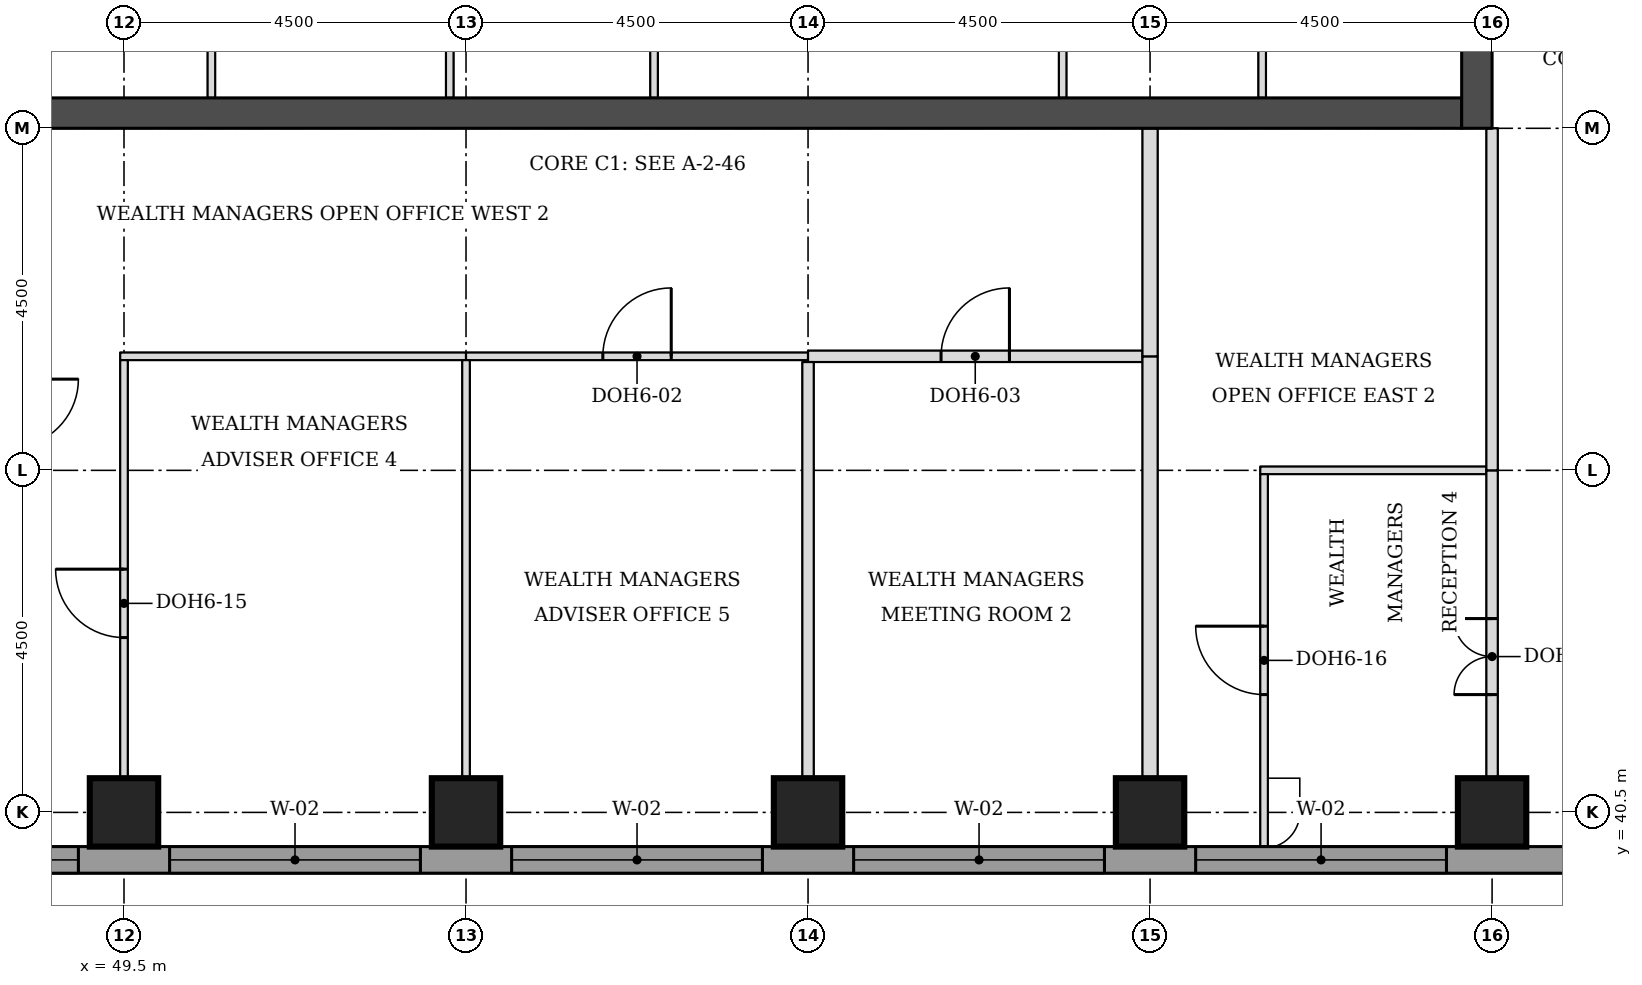
"""IFC4 building model, lengths in metres.
Left out: names, types, materials, properties, quantities, classifications, styles, units other than length and angle.
Written with IfcOpenShell. Run it as: python <this file> out.ifc"""

import sys

from ifc_helpers import new_model, si_unit, direction, frame, frame_2d, origin, origin_2d, place, context, subcontext, project, spatial, rectangle, extrude, element, fill, save


model = new_model("IFC4")
c1 = context("Model", 3, precision=1e-05, world=origin(), true_north=direction((0.0, 1.0)))
c2 = subcontext(c1, "Body", "Model", "MODEL_VIEW")
j1 = project(units=[si_unit("LENGTHUNIT", "METRE"), si_unit("PLANEANGLEUNIT", "RADIAN")], contexts=[c1])
p1 = place(None, origin())
s1 = spatial("IfcSite", under=j1, at=p1, CompositionType="ELEMENT")
p2 = place(p1, origin())
s2 = spatial("IfcBuilding", under=s1, at=p2, CompositionType="ELEMENT")
p3 = place(p2, frame((0.0, 0.0, 184.7)))
s3 = spatial("IfcBuildingStorey", under=s2, at=p3, CompositionType="ELEMENT", Elevation=184.7)
for number, where, z_axis, x_axis in (
    (1, (49.5, 40.5, 0.0), (0.0, 0.0, 1.0), (1.0, 0.0, 0.0)),
    (2, (54.0, 40.5, 0.0), (0.0, 0.0, 1.0), (1.0, 0.0, 0.0)),
    (3, (58.5, 40.5, 0.0), (0.0, 0.0, 1.0), (1.0, 0.0, 0.0)),
    (4, (63.0, 40.5, 0.0), (0.0, 0.0, 1.0), (1.0, 0.0, 0.0)),
    (5, (67.5, 40.5, 0.0), (0.0, 0.0, 1.0), (1.0, 0.0, 0.0)),
):
    element("IfcColumn", number, at=place(p3, frame(where, z_axis=z_axis, x_axis=x_axis)), inside=s3, PredefinedType="COLUMN", context=c2, shape_type="SweptSolid", body=[
        extrude(rectangle(XDim=0.9, YDim=0.9, at=origin_2d()), origin(), (0.0, 0.0, 1.0), 3.7),
    ])
p4 = place(p3, frame((45.4, 49.7, 0.0), z_axis=(0.0, 0.0, 1.0), x_axis=(1.0, 0.0, 0.0)))
e6 = element("IfcWall", 6, at=p4, inside=s3, PredefinedType="SHEAR", context=c2, shape_type="SweptSolid", body=[
    extrude(rectangle(XDim=21.7, YDim=0.4, at=frame_2d((10.85, 0.0))), origin(), (0.0, 0.0, 1.0), 3.7),
])
p5 = place(p3, frame((67.3, 49.5, 0.0), z_axis=(0.0, 0.0, 1.0), x_axis=(0.0, 1.0, 0.0)))
e7 = element("IfcWall", 7, at=p5, inside=s3, PredefinedType="SHEAR", context=c2, shape_type="SweptSolid", body=[
    extrude(rectangle(XDim=22.5, YDim=0.4, at=frame_2d((11.25, 0.0))), origin(), (0.0, 0.0, 1.0), 3.7),
])
p6 = place(p5, frame((4.2, 0.0, 0.0)))
e8 = element("IfcOpeningElement", 8, at=p6, cuts=e7, PredefinedType="OPENING", context=c2, shape_type="SweptSolid", body=[
    extrude(rectangle(XDim=1.8, YDim=2.1, at=frame_2d((0.9, 1.05))), frame((0.0, 0.21, 0.0), z_axis=(0.0, -1.0, 0.0), x_axis=(1.0, 0.0, 0.0)), (0.0, 0.0, 1.0), 0.42),
])
p7 = place(p5, frame((6.9, 0.0, 0.0)))
e9 = element("IfcOpeningElement", 9, at=p7, cuts=e7, PredefinedType="OPENING", context=c2, shape_type="SweptSolid", body=[
    extrude(rectangle(XDim=1.1, YDim=2.1, at=frame_2d((0.55, 1.05))), frame((0.0, 0.21, 0.0), z_axis=(0.0, -1.0, 0.0), x_axis=(1.0, 0.0, 0.0)), (0.0, 0.0, 1.0), 0.42),
])
p8 = place(p5, frame((13.6, 0.0, 0.0)))
e10 = element("IfcOpeningElement", 10, at=p8, cuts=e7, PredefinedType="OPENING", context=c2, shape_type="SweptSolid", body=[
    extrude(rectangle(XDim=1.1, YDim=2.1, at=frame_2d((0.55, 1.05))), frame((0.0, 0.21, 0.0), z_axis=(0.0, -1.0, 0.0), x_axis=(1.0, 0.0, 0.0)), (0.0, 0.0, 1.0), 0.42),
])
p9 = place(p5, frame((16.5, 0.0, 0.0)))
e11 = element("IfcOpeningElement", 11, at=p9, cuts=e7, PredefinedType="OPENING", context=c2, shape_type="SweptSolid", body=[
    extrude(rectangle(XDim=1.8, YDim=2.1, at=frame_2d((0.9, 1.05))), frame((0.0, 0.21, 0.0), z_axis=(0.0, -1.0, 0.0), x_axis=(1.0, 0.0, 0.0)), (0.0, 0.0, 1.0), 0.42),
])
p10 = place(p3, frame((36.0, 39.875, 0.0), z_axis=(0.0, 0.0, 1.0), x_axis=(1.0, 0.0, 0.0)))
e12 = element("IfcWall", 12, at=p10, inside=s3, PredefinedType="STANDARD", context=c2, shape_type="SweptSolid", body=[
    extrude(rectangle(XDim=36.331, YDim=0.35, at=frame_2d((18.166, 0.0))), origin(), (0.0, 0.0, 1.0), 3.525),
])
p11 = place(p10, frame((5.1, 0.0, 0.9)))
e13 = element("IfcOpeningElement", 13, at=p11, cuts=e12, PredefinedType="OPENING", context=c2, shape_type="SweptSolid", body=[
    extrude(rectangle(XDim=3.3, YDim=1.9, at=frame_2d((1.65, 0.95))), frame((0.0, 0.185, 0.0), z_axis=(0.0, -1.0, 0.0), x_axis=(1.0, 0.0, 0.0)), (0.0, 0.0, 1.0), 0.37),
])
p12 = place(p10, frame((9.6, 0.0, 0.9)))
e14 = element("IfcOpeningElement", 14, at=p12, cuts=e12, PredefinedType="OPENING", context=c2, shape_type="SweptSolid", body=[
    extrude(rectangle(XDim=3.3, YDim=1.9, at=frame_2d((1.65, 0.95))), frame((0.0, 0.185, 0.0), z_axis=(0.0, -1.0, 0.0), x_axis=(1.0, 0.0, 0.0)), (0.0, 0.0, 1.0), 0.37),
])
p13 = place(p10, frame((14.1, 0.0, 0.9)))
e15 = element("IfcOpeningElement", 15, at=p13, cuts=e12, PredefinedType="OPENING", context=c2, shape_type="SweptSolid", body=[
    extrude(rectangle(XDim=3.3, YDim=1.9, at=frame_2d((1.65, 0.95))), frame((0.0, 0.185, 0.0), z_axis=(0.0, -1.0, 0.0), x_axis=(1.0, 0.0, 0.0)), (0.0, 0.0, 1.0), 0.37),
])
p14 = place(p10, frame((18.6, 0.0, 0.9)))
e16 = element("IfcOpeningElement", 16, at=p14, cuts=e12, PredefinedType="OPENING", context=c2, shape_type="SweptSolid", body=[
    extrude(rectangle(XDim=3.3, YDim=1.9, at=frame_2d((1.65, 0.95))), frame((0.0, 0.185, 0.0), z_axis=(0.0, -1.0, 0.0), x_axis=(1.0, 0.0, 0.0)), (0.0, 0.0, 1.0), 0.37),
])
p15 = place(p10, frame((23.1, 0.0, 0.9)))
e17 = element("IfcOpeningElement", 17, at=p15, cuts=e12, PredefinedType="OPENING", context=c2, shape_type="SweptSolid", body=[
    extrude(rectangle(XDim=3.3, YDim=1.9, at=frame_2d((1.65, 0.95))), frame((0.0, 0.185, 0.0), z_axis=(0.0, -1.0, 0.0), x_axis=(1.0, 0.0, 0.0)), (0.0, 0.0, 1.0), 0.37),
])
p16 = place(p10, frame((27.6, 0.0, 0.9)))
e18 = element("IfcOpeningElement", 18, at=p16, cuts=e12, PredefinedType="OPENING", context=c2, shape_type="SweptSolid", body=[
    extrude(rectangle(XDim=3.3, YDim=1.9, at=frame_2d((1.65, 0.95))), frame((0.0, 0.185, 0.0), z_axis=(0.0, -1.0, 0.0), x_axis=(1.0, 0.0, 0.0)), (0.0, 0.0, 1.0), 0.37),
])
p17 = place(p3, frame((64.45, 45.0, 0.0), z_axis=(0.0, 0.0, 1.0), x_axis=(1.0, 0.0, 0.0)))
e19 = element("IfcWall", 19, at=p17, inside=s3, PredefinedType="PARTITIONING", context=c2, shape_type="SweptSolid", body=[
    extrude(rectangle(XDim=2.975, YDim=0.1, at=frame_2d((1.488, 0.0))), origin(), (0.0, 0.0, 1.0), 3.55),
])
p18 = place(p3, frame((49.45, 46.5, 0.0), z_axis=(0.0, 0.0, 1.0), x_axis=(1.0, 0.0, 0.0)))
e20 = element("IfcWall", 20, at=p18, inside=s3, PredefinedType="PARTITIONING", context=c2, shape_type="SweptSolid", body=[
    extrude(rectangle(XDim=4.55, YDim=0.1, at=frame_2d((2.275, 0.0))), origin(), (0.0, 0.0, 1.0), 3.55),
])
p19 = place(p3, frame((54.0, 46.5, 0.0), z_axis=(0.0, 0.0, 1.0), x_axis=(1.0, 0.0, 0.0)))
e21 = element("IfcWall", 21, at=p19, inside=s3, PredefinedType="PARTITIONING", context=c2, shape_type="SweptSolid", body=[
    extrude(rectangle(XDim=4.5, YDim=0.1, at=frame_2d((2.25, 0.0))), origin(), (0.0, 0.0, 1.0), 3.55),
])
p20 = place(p19, frame((1.8, 0.0, 0.0)))
e22 = element("IfcOpeningElement", 22, at=p20, cuts=e21, PredefinedType="OPENING", context=c2, shape_type="SweptSolid", body=[
    extrude(rectangle(XDim=0.9, YDim=2.1, at=frame_2d((0.45, 1.05))), frame((0.0, 0.06, 0.0), z_axis=(0.0, -1.0, 0.0), x_axis=(1.0, 0.0, 0.0)), (0.0, 0.0, 1.0), 0.12),
])
p21 = place(p3, frame((58.5, 46.5, 0.0), z_axis=(0.0, 0.0, 1.0), x_axis=(1.0, 0.0, 0.0)))
e23 = element("IfcWall", 23, at=p21, inside=s3, PredefinedType="PARTITIONING", context=c2, shape_type="SweptSolid", body=[
    extrude(rectangle(XDim=4.4, YDim=0.15, at=frame_2d((2.2, 0.0))), origin(), (0.0, 0.0, 1.0), 3.55),
])
p22 = place(p21, frame((1.75, 0.0, 0.0)))
e24 = element("IfcOpeningElement", 24, at=p22, cuts=e23, PredefinedType="OPENING", context=c2, shape_type="SweptSolid", body=[
    extrude(rectangle(XDim=0.9, YDim=2.1, at=frame_2d((0.45, 1.05))), frame((0.0, 0.085, 0.0), z_axis=(0.0, -1.0, 0.0), x_axis=(1.0, 0.0, 0.0)), (0.0, 0.0, 1.0), 0.17),
])
p23 = place(p3, frame((49.5, 40.05, 0.0), z_axis=(0.0, 0.0, 1.0), x_axis=(0.0, 1.0, 0.0)))
e25 = element("IfcWall", 25, at=p23, inside=s3, PredefinedType="PARTITIONING", context=c2, shape_type="SweptSolid", body=[
    extrude(rectangle(XDim=6.4, YDim=0.1, at=frame_2d((3.2, 0.0))), origin(), (0.0, 0.0, 1.0), 3.55),
])
p24 = place(p23, frame((2.75, 0.0, 0.0)))
e26 = element("IfcOpeningElement", 26, at=p24, cuts=e25, PredefinedType="OPENING", context=c2, shape_type="SweptSolid", body=[
    extrude(rectangle(XDim=0.9, YDim=2.1, at=frame_2d((0.45, 1.05))), frame((0.0, 0.06, 0.0), z_axis=(0.0, -1.0, 0.0), x_axis=(1.0, 0.0, 0.0)), (0.0, 0.0, 1.0), 0.12),
])
p25 = place(p3, frame((54.0, 40.05, 0.0), z_axis=(0.0, 0.0, 1.0), x_axis=(0.0, 1.0, 0.0)))
e27 = element("IfcWall", 27, at=p25, inside=s3, PredefinedType="PARTITIONING", context=c2, shape_type="SweptSolid", body=[
    extrude(rectangle(XDim=6.4, YDim=0.1, at=frame_2d((3.2, 0.0))), origin(), (0.0, 0.0, 1.0), 3.55),
])
p26 = place(p3, frame((58.5, 40.05, 0.0), z_axis=(0.0, 0.0, 1.0), x_axis=(0.0, 1.0, 0.0)))
e28 = element("IfcWall", 28, at=p26, inside=s3, PredefinedType="PARTITIONING", context=c2, shape_type="SweptSolid", body=[
    extrude(rectangle(XDim=6.375, YDim=0.15, at=frame_2d((3.188, 0.0))), origin(), (0.0, 0.0, 1.0), 3.55),
])
p27 = place(p3, frame((63.0, 40.05, 0.0), z_axis=(0.0, 0.0, 1.0), x_axis=(0.0, 1.0, 0.0)))
e29 = element("IfcWall", 29, at=p27, inside=s3, PredefinedType="PARTITIONING", context=c2, shape_type="SweptSolid", body=[
    extrude(rectangle(XDim=6.45, YDim=0.2, at=frame_2d((3.225, 0.0))), origin(), (0.0, 0.0, 1.0), 3.55),
])
p28 = place(p3, frame((64.5, 40.05, 0.0), z_axis=(0.0, 0.0, 1.0), x_axis=(0.0, 1.0, 0.0)))
e30 = element("IfcWall", 30, at=p28, inside=s3, PredefinedType="PARTITIONING", context=c2, shape_type="SweptSolid", body=[
    extrude(rectangle(XDim=4.9, YDim=0.1, at=frame_2d((2.45, 0.0))), origin(), (0.0, 0.0, 1.0), 3.55),
])
p29 = place(p28, frame((2.0, 0.0, 0.0)))
e31 = element("IfcOpeningElement", 31, at=p29, cuts=e30, PredefinedType="OPENING", context=c2, shape_type="SweptSolid", body=[
    extrude(rectangle(XDim=0.9, YDim=2.1, at=frame_2d((0.45, 1.05))), frame((0.0, 0.06, 0.0), z_axis=(0.0, -1.0, 0.0), x_axis=(1.0, 0.0, 0.0)), (0.0, 0.0, 1.0), 0.12),
])
p30 = place(p3, frame((67.5, 40.05, 0.0), z_axis=(0.0, 0.0, 1.0), x_axis=(0.0, 1.0, 0.0)))
e32 = element("IfcWall", 32, at=p30, inside=s3, PredefinedType="PARTITIONING", context=c2, shape_type="SweptSolid", body=[
    extrude(rectangle(XDim=4.95, YDim=0.15, at=frame_2d((2.475, 0.0))), origin(), (0.0, 0.0, 1.0), 3.022),
])
p31 = place(p30, frame((2.0, 0.0, 0.0)))
e33 = element("IfcOpeningElement", 33, at=p31, cuts=e32, PredefinedType="OPENING", context=c2, shape_type="SweptSolid", body=[
    extrude(rectangle(XDim=1.0, YDim=2.1, at=frame_2d((0.5, 1.05))), frame((0.0, 0.085, 0.0), z_axis=(0.0, -1.0, 0.0), x_axis=(1.0, 0.0, 0.0)), (0.0, 0.0, 1.0), 0.17),
])
p32 = place(p3, frame((67.5, 45.0, 0.0), z_axis=(0.0, 0.0, 1.0), x_axis=(0.0, 1.0, 0.0)))
e34 = element("IfcWall", 34, at=p32, inside=s3, PredefinedType="PARTITIONING", context=c2, shape_type="SweptSolid", body=[
    extrude(rectangle(XDim=4.5, YDim=0.15, at=frame_2d((2.25, 0.0))), origin(), (0.0, 0.0, 1.0), 3.022),
])
p33 = place(p3, frame((63.0, 46.5, 0.0), z_axis=(0.0, 0.0, 1.0), x_axis=(0.0, 1.0, 0.0)))
e35 = element("IfcWall", 35, at=p33, inside=s3, PredefinedType="PARTITIONING", context=c2, shape_type="SweptSolid", body=[
    extrude(rectangle(XDim=3.0, YDim=0.2, at=frame_2d((1.5, 0.0))), origin(), (0.0, 0.0, 1.0), 3.55),
])
for number, where, z_axis, x_axis in (
    (36, (50.65, 49.9, 0.0), (0.0, 0.0, 1.0), (0.0, 1.0, 0.0)),
    (37, (53.786, 49.9, 0.0), (0.0, 0.0, 1.0), (0.0, 1.0, 0.0)),
    (38, (56.474, 49.9, 0.0), (0.0, 0.0, 1.0), (0.0, 1.0, 0.0)),
    (39, (61.85, 49.9, 0.0), (0.0, 0.0, 1.0), (0.0, 1.0, 0.0)),
    (40, (64.475, 49.9, 0.0), (0.0, 0.0, 1.0), (0.0, 1.0, 0.0)),
):
    element("IfcWall", number, at=place(p3, frame(where, z_axis=z_axis, x_axis=x_axis)), inside=s3, PredefinedType="PARTITIONING", context=c2, shape_type="SweptSolid", body=[
        extrude(rectangle(XDim=3.1, YDim=0.1, at=frame_2d((1.55, 0.0))), origin(), (0.0, 0.0, 1.0), 3.55),
    ])
p34 = place(p12, origin())
e41 = element("IfcWindow", 41, at=p34, inside=s3, PartitioningType="SINGLE_PANEL", PredefinedType="WINDOW", context=c2, shape_type="SweptSolid", body=[
    extrude(rectangle(XDim=3.3, YDim=1.9, at=frame_2d((1.65, 0.95))), frame((0.0, 0.085, 0.0), z_axis=(0.0, -1.0, 0.0), x_axis=(1.0, 0.0, 0.0)), (0.0, 0.0, 1.0), 0.06),
])
fill(e14, e41)
p35 = place(p13, origin())
e42 = element("IfcWindow", 42, at=p35, inside=s3, PartitioningType="SINGLE_PANEL", PredefinedType="WINDOW", context=c2, shape_type="SweptSolid", body=[
    extrude(rectangle(XDim=3.3, YDim=1.9, at=frame_2d((1.65, 0.95))), frame((0.0, 0.085, 0.0), z_axis=(0.0, -1.0, 0.0), x_axis=(1.0, 0.0, 0.0)), (0.0, 0.0, 1.0), 0.06),
])
fill(e15, e42)
p36 = place(p14, origin())
e43 = element("IfcWindow", 43, at=p36, inside=s3, PartitioningType="SINGLE_PANEL", PredefinedType="WINDOW", context=c2, shape_type="SweptSolid", body=[
    extrude(rectangle(XDim=3.3, YDim=1.9, at=frame_2d((1.65, 0.95))), frame((0.0, 0.085, 0.0), z_axis=(0.0, -1.0, 0.0), x_axis=(1.0, 0.0, 0.0)), (0.0, 0.0, 1.0), 0.06),
])
fill(e16, e43)
p37 = place(p15, origin())
e44 = element("IfcWindow", 44, at=p37, inside=s3, PartitioningType="SINGLE_PANEL", PredefinedType="WINDOW", context=c2, shape_type="SweptSolid", body=[
    extrude(rectangle(XDim=3.3, YDim=1.9, at=frame_2d((1.65, 0.95))), frame((0.0, 0.085, 0.0), z_axis=(0.0, -1.0, 0.0), x_axis=(1.0, 0.0, 0.0)), (0.0, 0.0, 1.0), 0.06),
])
fill(e17, e44)
p38 = place(p16, origin())
e45 = element("IfcWindow", 45, at=p38, inside=s3, PartitioningType="SINGLE_PANEL", PredefinedType="WINDOW", context=c2, shape_type="SweptSolid", body=[
    extrude(rectangle(XDim=3.3, YDim=1.9, at=frame_2d((1.65, 0.95))), frame((0.0, 0.085, 0.0), z_axis=(0.0, -1.0, 0.0), x_axis=(1.0, 0.0, 0.0)), (0.0, 0.0, 1.0), 0.06),
])
fill(e18, e45)
p39 = place(p24, origin())
e46 = element("IfcDoor", 46, at=p39, inside=s3, OperationType="SINGLE_SWING_RIGHT", PredefinedType="DOOR", context=c2, shape_type="SweptSolid", body=[
    extrude(rectangle(XDim=0.9, YDim=2.1, at=frame_2d((0.45, 1.05))), frame((0.0, 0.025, 0.0), z_axis=(0.0, -1.0, 0.0), x_axis=(1.0, 0.0, 0.0)), (0.0, 0.0, 1.0), 0.05),
])
fill(e26, e46)
p40 = place(p20, origin())
e47 = element("IfcDoor", 47, at=p40, inside=s3, OperationType="SINGLE_SWING_RIGHT", PredefinedType="DOOR", context=c2, shape_type="SweptSolid", body=[
    extrude(rectangle(XDim=0.9, YDim=2.1, at=frame_2d((0.45, 1.05))), frame((0.0, 0.025, 0.0), z_axis=(0.0, -1.0, 0.0), x_axis=(1.0, 0.0, 0.0)), (0.0, 0.0, 1.0), 0.05),
])
fill(e22, e47)
p41 = place(p22, origin())
e48 = element("IfcDoor", 48, at=p41, inside=s3, OperationType="SINGLE_SWING_RIGHT", PredefinedType="DOOR", context=c2, shape_type="SweptSolid", body=[
    extrude(rectangle(XDim=0.9, YDim=2.1, at=frame_2d((0.45, 1.05))), frame((0.0, 0.025, 0.0), z_axis=(0.0, -1.0, 0.0), x_axis=(1.0, 0.0, 0.0)), (0.0, 0.0, 1.0), 0.05),
])
fill(e24, e48)
p42 = place(p31, origin())
e49 = element("IfcDoor", 49, at=p42, inside=s3, OperationType="DOUBLE_DOOR_SINGLE_SWING", PredefinedType="DOOR", context=c2, shape_type="SweptSolid", body=[
    extrude(rectangle(XDim=1.0, YDim=2.1, at=frame_2d((0.5, 1.05))), frame((0.0, 0.025, 0.0), z_axis=(0.0, -1.0, 0.0), x_axis=(1.0, 0.0, 0.0)), (0.0, 0.0, 1.0), 0.05),
])
fill(e33, e49)
p43 = place(p29, origin())
e50 = element("IfcDoor", 50, at=p43, inside=s3, OperationType="SINGLE_SWING_RIGHT", PredefinedType="DOOR", context=c2, shape_type="SweptSolid", body=[
    extrude(rectangle(XDim=0.9, YDim=2.1, at=frame_2d((0.45, 1.05))), frame((0.0, 0.025, 0.0), z_axis=(0.0, -1.0, 0.0), x_axis=(1.0, 0.0, 0.0)), (0.0, 0.0, 1.0), 0.05),
])
fill(e31, e50)
save(model, sys.argv[1])
